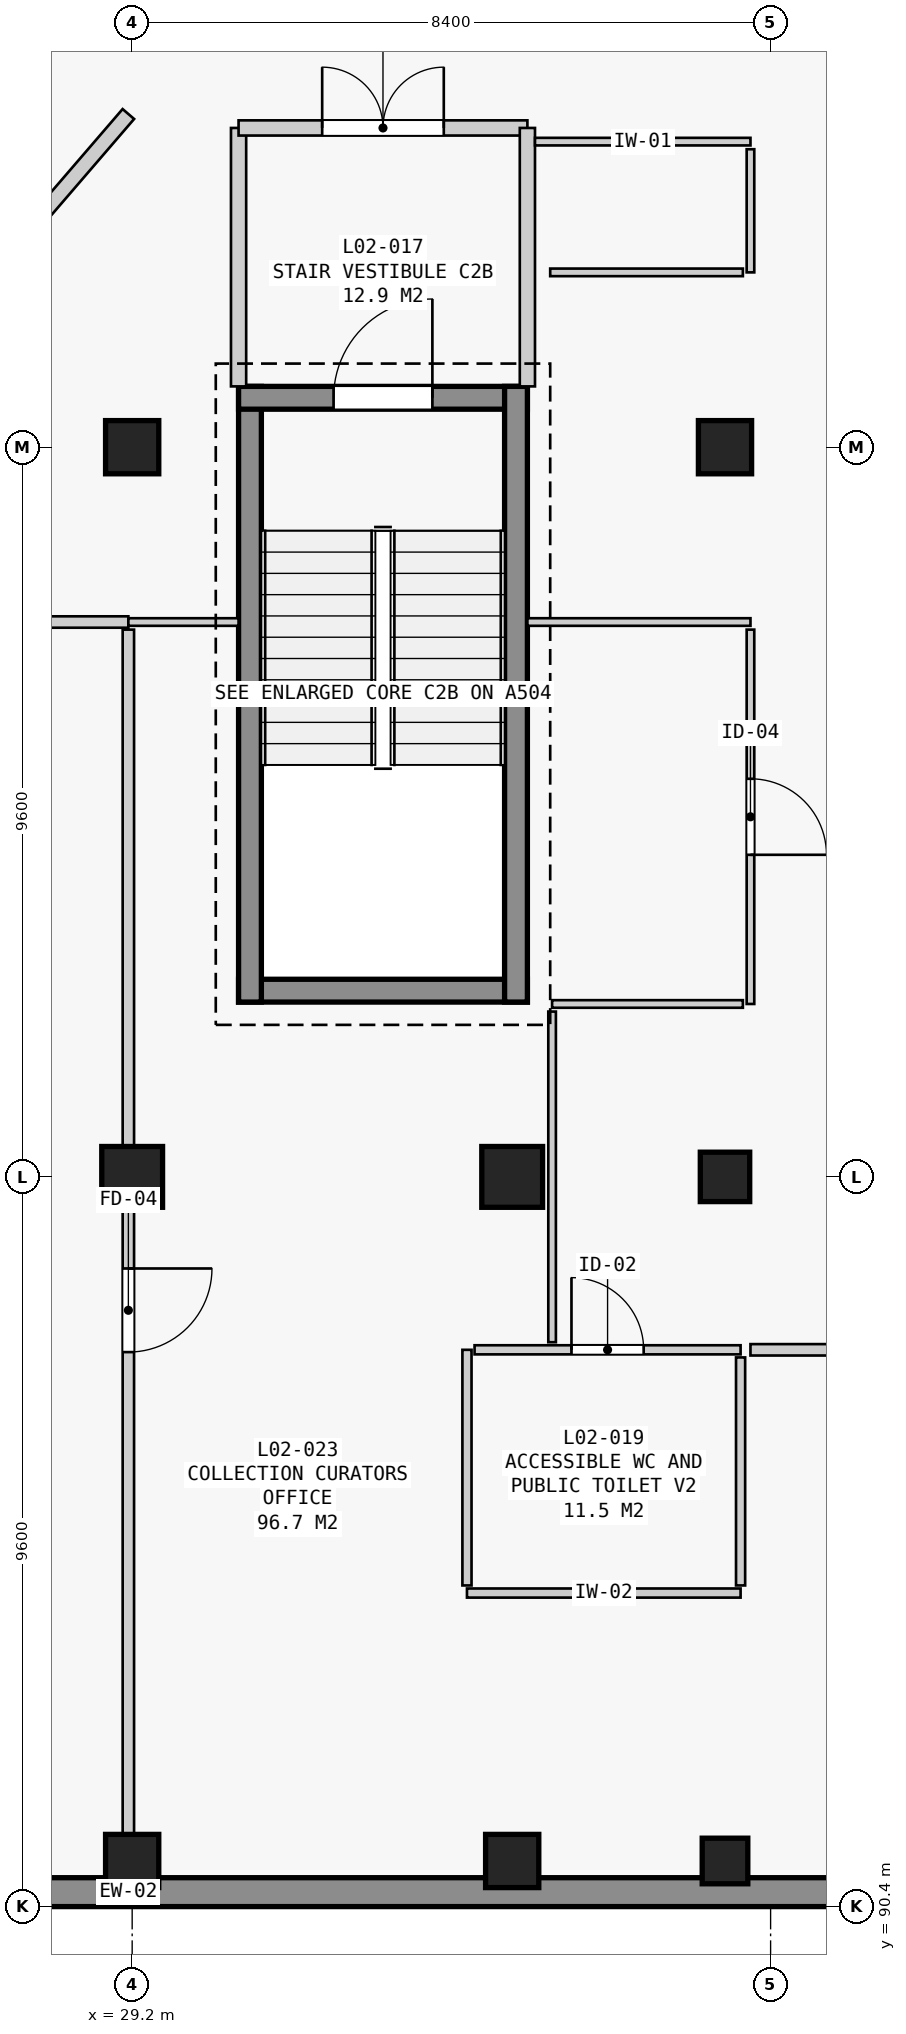
"""IFC4 building model, lengths in metres.
Left out: names, types, materials, properties, quantities, classifications, styles, units other than length and angle.
Written with IfcOpenShell. Run it as: python <this file> out.ifc"""

import sys

from ifc_helpers import new_model, si_unit, direction, frame, frame_2d, origin, origin_2d, place, context, subcontext, project, spatial, rectangle, extrude, element, fill, save


model = new_model("IFC4")
c1 = context("Model", 3, precision=1e-05, world=origin(), true_north=direction((0.0, 1.0)))
c2 = subcontext(c1, "Body", "Model", "MODEL_VIEW")
j1 = project(units=[si_unit("LENGTHUNIT", "METRE"), si_unit("PLANEANGLEUNIT", "RADIAN")], contexts=[c1])
p1 = place(None, origin())
s1 = spatial("IfcSite", under=j1, at=p1, CompositionType="ELEMENT")
p2 = place(p1, origin())
s2 = spatial("IfcBuilding", under=s1, at=p2, CompositionType="ELEMENT")
p3 = place(p2, frame((0.0, 0.0, 9.6)))
s3 = spatial("IfcBuildingStorey", under=s2, at=p3, CompositionType="ELEMENT", Elevation=9.6)
p4 = place(p3, frame((29.2, 91.0, 0.0), z_axis=(0.0, 0.0, 1.0), x_axis=(1.0, 0.0, 0.0)))
e1 = element("IfcColumn", 1, at=p4, inside=s3, PredefinedType="COLUMN", context=c2, shape_type="SweptSolid", body=[
    extrude(rectangle(XDim=0.7, YDim=0.7, at=origin_2d()), origin(), (0.0, 0.0, 1.0), 4.2),
])
p5 = place(p3, frame((29.2, 100.0, 0.0), z_axis=(0.0, 0.0, 1.0), x_axis=(1.0, 0.0, 0.0)))
e2 = element("IfcColumn", 2, at=p5, inside=s3, PredefinedType="COLUMN", context=c2, shape_type="SweptSolid", body=[
    extrude(rectangle(XDim=0.8, YDim=0.8, at=origin_2d()), origin(), (0.0, 0.0, 1.0), 4.2),
])
for number, where, z_axis, x_axis in (
    (3, (29.2, 109.6, 0.0), (0.0, 0.0, 1.0), (1.0, 0.0, 0.0)),
    (4, (34.2, 91.0, 0.0), (0.0, 0.0, 1.0), (1.0, 0.0, 0.0)),
):
    element("IfcColumn", number, at=place(p3, frame(where, z_axis=z_axis, x_axis=x_axis)), inside=s3, PredefinedType="COLUMN", context=c2, shape_type="SweptSolid", body=[
        extrude(rectangle(XDim=0.7, YDim=0.7, at=origin_2d()), origin(), (0.0, 0.0, 1.0), 4.2),
    ])
p6 = place(p3, frame((34.2, 100.0, 0.0), z_axis=(0.0, 0.0, 1.0), x_axis=(1.0, 0.0, 0.0)))
e5 = element("IfcColumn", 5, at=p6, inside=s3, PredefinedType="COLUMN", context=c2, shape_type="SweptSolid", body=[
    extrude(rectangle(XDim=0.8, YDim=0.8, at=origin_2d()), origin(), (0.0, 0.0, 1.0), 4.2),
])
p7 = place(p3, frame((37.0, 91.0, 0.0), z_axis=(0.0, 0.0, 1.0), x_axis=(1.0, 0.0, 0.0)))
e6 = element("IfcColumn", 6, at=p7, inside=s3, PredefinedType="COLUMN", context=c2, shape_type="SweptSolid", body=[
    extrude(rectangle(XDim=0.6, YDim=0.6, at=origin_2d()), origin(), (0.0, 0.0, 1.0), 4.2),
])
p8 = place(p3, frame((37.0, 100.0, 0.0), z_axis=(0.0, 0.0, 1.0), x_axis=(1.0, 0.0, 0.0)))
e7 = element("IfcColumn", 7, at=p8, inside=s3, PredefinedType="COLUMN", context=c2, shape_type="SweptSolid", body=[
    extrude(rectangle(XDim=0.65, YDim=0.65, at=origin_2d()), origin(), (0.0, 0.0, 1.0), 4.2),
])
p9 = place(p3, frame((37.0, 109.6, 0.0), z_axis=(0.0, 0.0, 1.0), x_axis=(1.0, 0.0, 0.0)))
e8 = element("IfcColumn", 8, at=p9, inside=s3, PredefinedType="COLUMN", context=c2, shape_type="SweptSolid", body=[
    extrude(rectangle(XDim=0.7, YDim=0.7, at=origin_2d()), origin(), (0.0, 0.0, 1.0), 4.2),
])
p10 = place(p3, frame((45.71, 90.59, 0.0), z_axis=(0.0, 0.0, 1.0), x_axis=(-1.0, 0.0, 0.0)))
e9 = element("IfcWall", 9, at=p10, inside=s3, PredefinedType="STANDARD", context=c2, shape_type="SweptSolid", body=[
    extrude(rectangle(XDim=33.12, YDim=0.38, at=frame_2d((16.56, 0.0))), origin(), (0.0, 0.0, 1.0), 3.88),
])
p11 = place(p3, frame((34.4, 102.45, 0.0), z_axis=(0.0, 0.0, 1.0), x_axis=(-1.0, 0.0, 0.0)))
e10 = element("IfcWall", 10, at=p11, inside=s3, PredefinedType="SHEAR", context=c2, shape_type="SweptSolid", body=[
    extrude(rectangle(XDim=3.8, YDim=0.3, at=frame_2d((1.9, 0.0))), origin(), (0.0, 0.0, 1.0), 3.88),
])
p12 = place(p3, frame((30.75, 102.3, 0.0), z_axis=(0.0, 0.0, 1.0), x_axis=(0.0, 1.0, 0.0)))
e11 = element("IfcWall", 11, at=p12, inside=s3, PredefinedType="SHEAR", context=c2, shape_type="SweptSolid", body=[
    extrude(rectangle(XDim=8.1, YDim=0.3, at=frame_2d((4.05, 0.0))), origin(), (0.0, 0.0, 1.0), 3.88),
])
p13 = place(p3, frame((30.6, 110.25, 0.0), z_axis=(0.0, 0.0, 1.0), x_axis=(1.0, 0.0, 0.0)))
e12 = element("IfcWall", 12, at=p13, inside=s3, PredefinedType="SHEAR", context=c2, shape_type="SweptSolid", body=[
    extrude(rectangle(XDim=3.8, YDim=0.3, at=frame_2d((1.9, 0.0))), origin(), (0.0, 0.0, 1.0), 3.88),
])
p14 = place(p13, frame((1.25, 0.0, 0.0)))
e13 = element("IfcOpeningElement", 13, at=p14, cuts=e12, PredefinedType="OPENING", context=c2, shape_type="SweptSolid", body=[
    extrude(rectangle(XDim=1.3, YDim=2.2, at=frame_2d((0.65, 1.1))), frame((0.0, 0.16, 0.0), z_axis=(0.0, -1.0, 0.0), x_axis=(1.0, 0.0, 0.0)), (0.0, 0.0, 1.0), 0.32),
])
p15 = place(p3, frame((34.25, 110.4, 0.0), z_axis=(0.0, 0.0, 1.0), x_axis=(0.0, -1.0, 0.0)))
e14 = element("IfcWall", 14, at=p15, inside=s3, PredefinedType="SHEAR", context=c2, shape_type="SweptSolid", body=[
    extrude(rectangle(XDim=8.1, YDim=0.3, at=frame_2d((4.05, 0.0))), origin(), (0.0, 0.0, 1.0), 3.88),
])
p16 = place(p3, frame((30.6, 110.4, 0.0), z_axis=(0.0, 0.0, 1.0), x_axis=(0.0, 1.0, 0.0)))
e15 = element("IfcWall", 15, at=p16, inside=s3, PredefinedType="STANDARD", context=c2, shape_type="SweptSolid", body=[
    extrude(rectangle(XDim=3.4, YDim=0.2, at=frame_2d((1.7, 0.0))), origin(), (0.0, 0.0, 1.0), 3.88),
])
p17 = place(p3, frame((30.6, 113.8, 0.0), z_axis=(0.0, 0.0, 1.0), x_axis=(1.0, 0.0, 0.0)))
e16 = element("IfcWall", 16, at=p17, inside=s3, PredefinedType="STANDARD", context=c2, shape_type="SweptSolid", body=[
    extrude(rectangle(XDim=3.8, YDim=0.2, at=frame_2d((1.9, 0.0))), origin(), (0.0, 0.0, 1.0), 3.88),
])
p18 = place(p17, frame((1.1, 0.0, 0.0)))
e17 = element("IfcOpeningElement", 17, at=p18, cuts=e16, PredefinedType="OPENING", context=c2, shape_type="SweptSolid", body=[
    extrude(rectangle(XDim=1.6, YDim=2.2, at=frame_2d((0.8, 1.1))), frame((0.0, 0.11, 0.0), z_axis=(0.0, -1.0, 0.0), x_axis=(1.0, 0.0, 0.0)), (0.0, 0.0, 1.0), 0.22),
])
p19 = place(p3, frame((34.4, 113.8, 0.0), z_axis=(0.0, 0.0, 1.0), x_axis=(0.0, -1.0, 0.0)))
e18 = element("IfcWall", 18, at=p19, inside=s3, PredefinedType="STANDARD", context=c2, shape_type="SweptSolid", body=[
    extrude(rectangle(XDim=3.4, YDim=0.2, at=frame_2d((1.7, 0.0))), origin(), (0.0, 0.0, 1.0), 3.88),
])
p20 = place(p3, frame((37.205, 94.525, 0.0), z_axis=(0.0, 0.0, 1.0), x_axis=(-1.0, 0.0, 0.0)))
e19 = element("IfcWall", 19, at=p20, inside=s3, PredefinedType="PARTITIONING", context=c2, shape_type="SweptSolid", body=[
    extrude(rectangle(XDim=3.6, YDim=0.12, at=frame_2d((1.8, 0.0))), origin(), (0.0, 0.0, 1.0), 3.01),
])
p21 = place(p3, frame((33.605, 94.625, 0.0), z_axis=(0.0, 0.0, 1.0), x_axis=(0.0, 1.0, 0.0)))
e20 = element("IfcWall", 20, at=p21, inside=s3, PredefinedType="PARTITIONING", context=c2, shape_type="SweptSolid", body=[
    extrude(rectangle(XDim=3.1, YDim=0.12, at=frame_2d((1.55, 0.0))), origin(), (0.0, 0.0, 1.0), 3.88),
])
p22 = place(p3, frame((33.705, 97.725, 0.0), z_axis=(0.0, 0.0, 1.0), x_axis=(1.0, 0.0, 0.0)))
e21 = element("IfcWall", 21, at=p22, inside=s3, PredefinedType="PARTITIONING", context=c2, shape_type="SweptSolid", body=[
    extrude(rectangle(XDim=3.5, YDim=0.12, at=frame_2d((1.75, 0.0))), origin(), (0.0, 0.0, 1.0), 3.01),
])
p23 = place(p22, frame((1.275, 0.0, 0.0)))
e22 = element("IfcOpeningElement", 22, at=p23, cuts=e21, PredefinedType="OPENING", context=c2, shape_type="SweptSolid", body=[
    extrude(rectangle(XDim=0.95, YDim=2.15, at=frame_2d((0.475, 1.075))), frame((0.0, 0.07, 0.0), z_axis=(0.0, -1.0, 0.0), x_axis=(1.0, 0.0, 0.0)), (0.0, 0.0, 1.0), 0.14),
])
p24 = place(p3, frame((37.205, 97.625, 0.0), z_axis=(0.0, 0.0, 1.0), x_axis=(0.0, -1.0, 0.0)))
e23 = element("IfcWall", 23, at=p24, inside=s3, PredefinedType="PARTITIONING", context=c2, shape_type="SweptSolid", body=[
    extrude(rectangle(XDim=3.0, YDim=0.12, at=frame_2d((1.5, 0.0))), origin(), (0.0, 0.0, 1.0), 3.01),
])
p25 = place(p3, frame((27.831, 107.3, 0.0), z_axis=(0.0, 0.0, 1.0), x_axis=(1.0, 0.0, 0.0)))
e24 = element("IfcWall", 24, at=p25, inside=s3, PredefinedType="PARTITIONING", context=c2, shape_type="SweptSolid", body=[
    extrude(rectangle(XDim=1.319, YDim=0.15, at=frame_2d((0.66, 0.0))), origin(), (0.0, 0.0, 1.0), 3.06),
])
p26 = place(p3, frame((29.15, 107.2, 0.0), z_axis=(0.0, 0.0, 1.0), x_axis=(0.0, -1.0, 0.0)))
e25 = element("IfcWall", 25, at=p26, inside=s3, PredefinedType="PARTITIONING", context=c2, shape_type="SweptSolid", body=[
    extrude(rectangle(XDim=16.51, YDim=0.15, at=frame_2d((8.255, 0.0))), origin(), (0.0, 0.0, 1.0), 3.06),
])
p27 = place(p26, frame((8.405, 0.0, 0.0)))
e26 = element("IfcOpeningElement", 26, at=p27, cuts=e25, PredefinedType="OPENING", context=c2, shape_type="SweptSolid", body=[
    extrude(rectangle(XDim=1.1, YDim=2.15, at=frame_2d((0.55, 1.075))), frame((0.0, 0.085, 0.0), z_axis=(0.0, -1.0, 0.0), x_axis=(1.0, 0.0, 0.0)), (0.0, 0.0, 1.0), 0.17),
])
p28 = place(p3, frame((29.15, 113.983, 0.0), z_axis=(0.0, 0.0, 1.0), x_axis=(-0.652333289854, -0.757932239022, 0.0)))
e27 = element("IfcWall", 27, at=p28, inside=s3, PredefinedType="STANDARD", context=c2, shape_type="SweptSolid", body=[
    extrude(rectangle(XDim=2.749, YDim=0.2, at=frame_2d((1.375, 0.0))), origin(), (0.0, 0.0, 1.0), 3.01),
])
p29 = place(p3, frame((34.5, 113.62, 0.0), z_axis=(0.0, 0.0, 1.0), x_axis=(1.0, 0.0, 0.0)))
e28 = element("IfcWall", 28, at=p29, inside=s3, PredefinedType="PARTITIONING", context=c2, shape_type="SweptSolid", body=[
    extrude(rectangle(XDim=2.835, YDim=0.1, at=frame_2d((1.417, 0.0))), origin(), (0.0, 0.0, 1.0), 3.16),
])
p30 = place(p3, frame((37.335, 113.52, 0.0), z_axis=(0.0, 0.0, 1.0), x_axis=(0.0, -1.0, 0.0)))
e29 = element("IfcWall", 29, at=p30, inside=s3, PredefinedType="PARTITIONING", context=c2, shape_type="SweptSolid", body=[
    extrude(rectangle(XDim=1.62, YDim=0.1, at=frame_2d((0.81, 0.0))), origin(), (0.0, 0.0, 1.0), 3.88),
])
p31 = place(p3, frame((37.235, 111.9, 0.0), z_axis=(0.0, 0.0, 1.0), x_axis=(-1.0, 0.0, 0.0)))
e30 = element("IfcWall", 30, at=p31, inside=s3, PredefinedType="PARTITIONING", context=c2, shape_type="SweptSolid", body=[
    extrude(rectangle(XDim=2.535, YDim=0.1, at=frame_2d((1.268, 0.0))), origin(), (0.0, 0.0, 1.0), 3.16),
])
p32 = place(p3, frame((34.4, 107.3, 0.0), z_axis=(0.0, 0.0, 1.0), x_axis=(1.0, 0.0, 0.0)))
e31 = element("IfcWall", 31, at=p32, inside=s3, PredefinedType="PARTITIONING", context=c2, shape_type="SweptSolid", body=[
    extrude(rectangle(XDim=2.935, YDim=0.1, at=frame_2d((1.468, 0.0))), origin(), (0.0, 0.0, 1.0), 2.96),
])
p33 = place(p3, frame((37.335, 107.2, 0.0), z_axis=(0.0, 0.0, 1.0), x_axis=(0.0, -1.0, 0.0)))
e32 = element("IfcWall", 32, at=p33, inside=s3, PredefinedType="PARTITIONING", context=c2, shape_type="SweptSolid", body=[
    extrude(rectangle(XDim=4.925, YDim=0.1, at=frame_2d((2.462, 0.0))), origin(), (0.0, 0.0, 1.0), 2.96),
])
p34 = place(p33, frame((1.962, 0.0, 0.0)))
e33 = element("IfcOpeningElement", 33, at=p34, cuts=e32, PredefinedType="OPENING", context=c2, shape_type="SweptSolid", body=[
    extrude(rectangle(XDim=1.0, YDim=2.15, at=frame_2d((0.5, 1.075))), frame((0.0, 0.06, 0.0), z_axis=(0.0, -1.0, 0.0), x_axis=(1.0, 0.0, 0.0)), (0.0, 0.0, 1.0), 0.12),
])
p35 = place(p3, frame((37.235, 102.275, 0.0), z_axis=(0.0, 0.0, 1.0), x_axis=(-1.0, 0.0, 0.0)))
e34 = element("IfcWall", 34, at=p35, inside=s3, PredefinedType="PARTITIONING", context=c2, shape_type="SweptSolid", body=[
    extrude(rectangle(XDim=2.51, YDim=0.1, at=frame_2d((1.255, 0.0))), origin(), (0.0, 0.0, 1.0), 2.96),
])
p36 = place(p3, frame((34.725, 102.175, 0.0), z_axis=(0.0, 0.0, 1.0), x_axis=(0.0, -1.0, 0.0)))
e35 = element("IfcWall", 35, at=p36, inside=s3, PredefinedType="PARTITIONING", context=c2, shape_type="SweptSolid", body=[
    extrude(rectangle(XDim=4.35, YDim=0.1, at=frame_2d((2.175, 0.0))), origin(), (0.0, 0.0, 1.0), 3.16),
])
p37 = place(p3, frame((29.15, 107.3, 0.0), z_axis=(0.0, 0.0, 1.0), x_axis=(1.0, 0.0, 0.0)))
e36 = element("IfcWall", 36, at=p37, inside=s3, PredefinedType="PARTITIONING", context=c2, shape_type="SweptSolid", body=[
    extrude(rectangle(XDim=1.45, YDim=0.1, at=frame_2d((0.725, 0.0))), origin(), (0.0, 0.0, 1.0), 3.06),
])
p38 = place(p3, frame((37.335, 97.725, 0.0), z_axis=(0.0, 0.0, 1.0), x_axis=(1.0, 0.0, 0.0)))
e37 = element("IfcWall", 37, at=p38, inside=s3, PredefinedType="PARTITIONING", context=c2, shape_type="SweptSolid", body=[
    extrude(rectangle(XDim=1.94, YDim=0.15, at=frame_2d((0.97, 0.0))), origin(), (0.0, 0.0, 1.0), 3.88),
])
p39 = place(p14, origin())
e38 = element("IfcDoor", 38, at=p39, inside=s3, OperationType="SINGLE_SWING_RIGHT", PredefinedType="DOOR", context=c2, shape_type="SweptSolid", body=[
    extrude(rectangle(XDim=1.3, YDim=2.2, at=frame_2d((0.65, 1.1))), frame((0.0, 0.025, 0.0), z_axis=(0.0, -1.0, 0.0), x_axis=(1.0, 0.0, 0.0)), (0.0, 0.0, 1.0), 0.05),
])
fill(e13, e38)
p40 = place(p18, origin())
e39 = element("IfcDoor", 39, at=p40, inside=s3, OperationType="DOUBLE_DOOR_SINGLE_SWING", PredefinedType="DOOR", context=c2, shape_type="SweptSolid", body=[
    extrude(rectangle(XDim=1.6, YDim=2.2, at=frame_2d((0.8, 1.1))), frame((0.0, 0.025, 0.0), z_axis=(0.0, -1.0, 0.0), x_axis=(1.0, 0.0, 0.0)), (0.0, 0.0, 1.0), 0.05),
])
fill(e17, e39)
p41 = place(p23, origin())
e40 = element("IfcDoor", 40, at=p41, inside=s3, OperationType="SINGLE_SWING_LEFT", PredefinedType="DOOR", context=c2, shape_type="SweptSolid", body=[
    extrude(rectangle(XDim=0.95, YDim=2.15, at=frame_2d((0.475, 1.075))), frame((0.0, 0.025, 0.0), z_axis=(0.0, -1.0, 0.0), x_axis=(1.0, 0.0, 0.0)), (0.0, 0.0, 1.0), 0.05),
])
fill(e22, e40)
p42 = place(p27, origin())
e41 = element("IfcDoor", 41, at=p42, inside=s3, OperationType="SINGLE_SWING_LEFT", PredefinedType="DOOR", context=c2, shape_type="SweptSolid", body=[
    extrude(rectangle(XDim=1.1, YDim=2.15, at=frame_2d((0.55, 1.075))), frame((0.0, 0.025, 0.0), z_axis=(0.0, -1.0, 0.0), x_axis=(1.0, 0.0, 0.0)), (0.0, 0.0, 1.0), 0.05),
])
fill(e26, e41)
p43 = place(p34, origin())
e42 = element("IfcDoor", 42, at=p43, inside=s3, OperationType="SINGLE_SWING_RIGHT", PredefinedType="DOOR", context=c2, shape_type="SweptSolid", body=[
    extrude(rectangle(XDim=1.0, YDim=2.15, at=frame_2d((0.5, 1.075))), frame((0.0, 0.025, 0.0), z_axis=(0.0, -1.0, 0.0), x_axis=(1.0, 0.0, 0.0)), (0.0, 0.0, 1.0), 0.05),
])
fill(e33, e42)
save(model, sys.argv[1])
